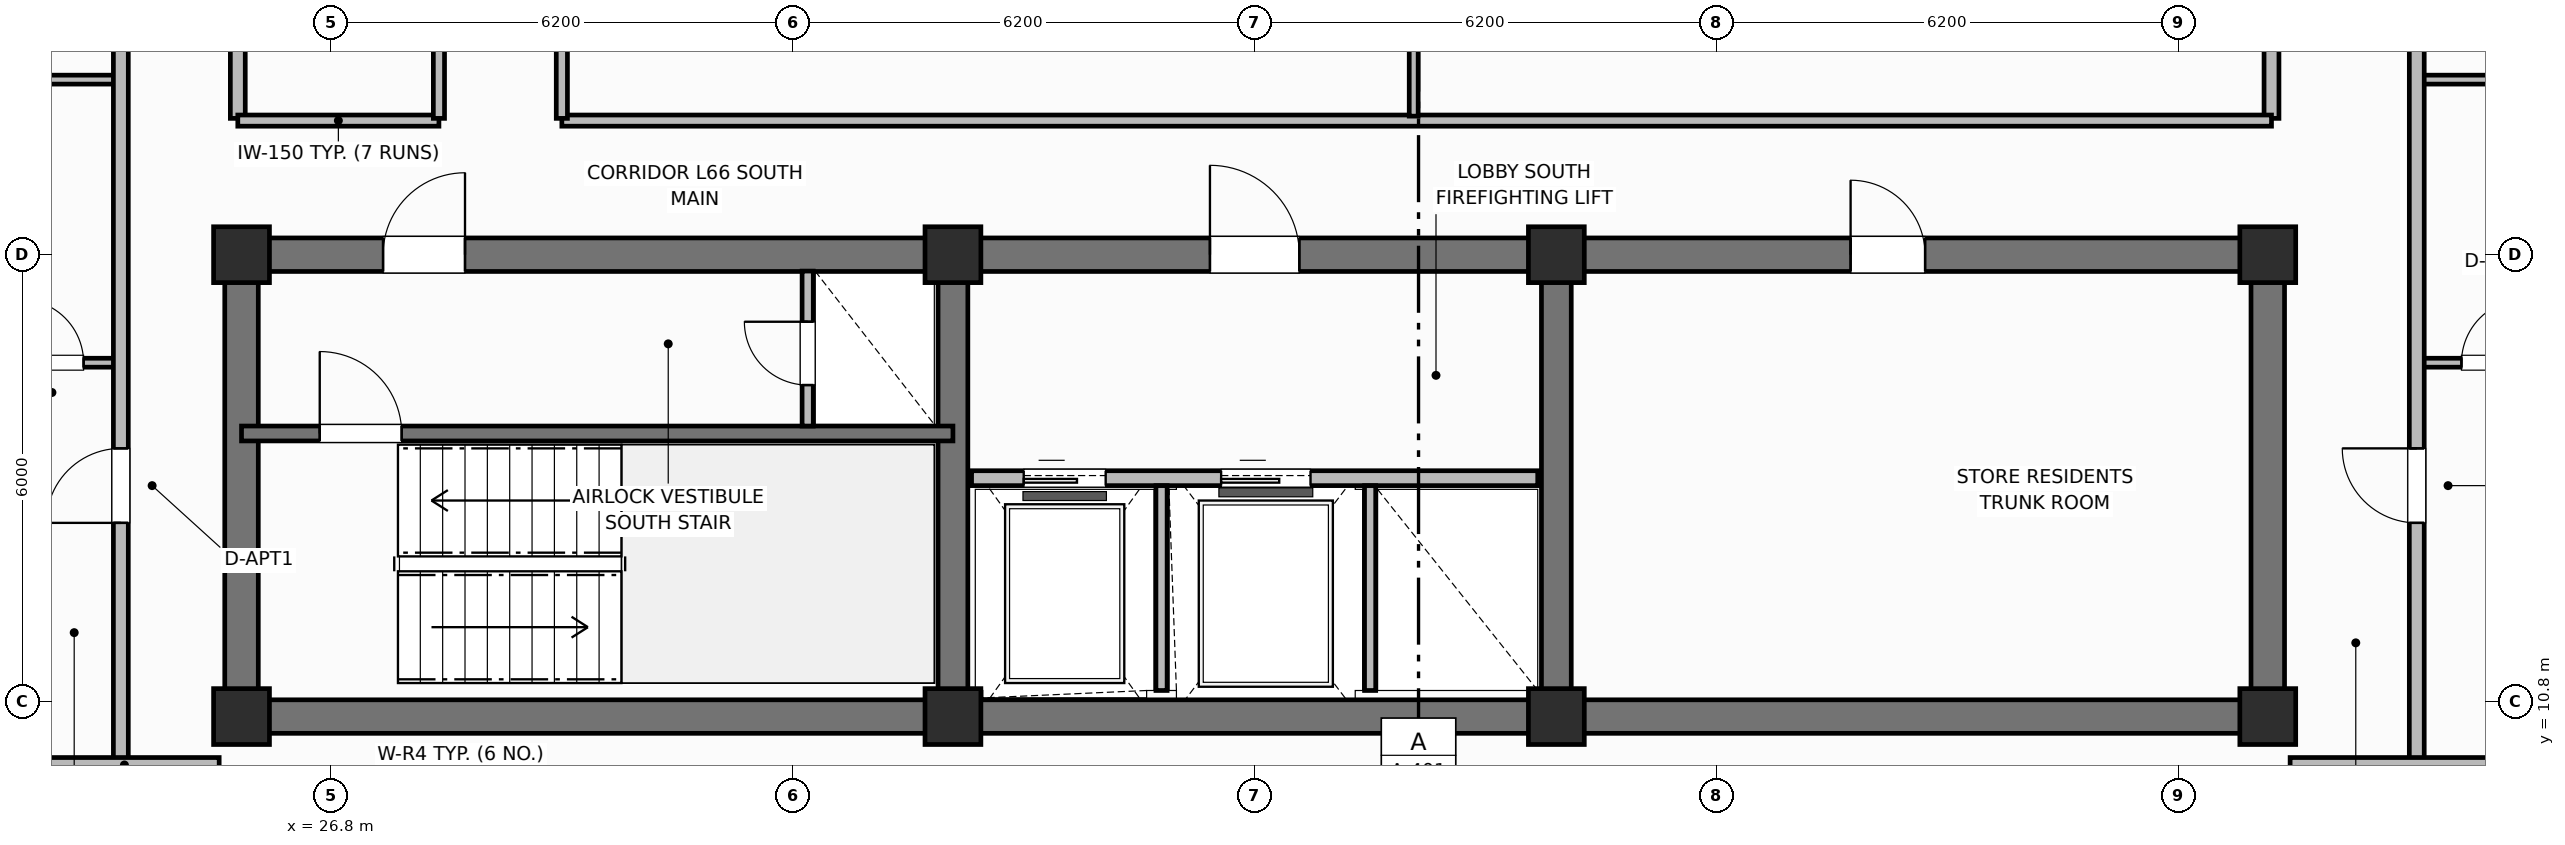
"""IFC4 building model, lengths in metres.
Left out: names, types, materials, properties, quantities, classifications, styles, units other than length and angle.
Written with IfcOpenShell. Run it as: python <this file> out.ifc"""

import sys

from ifc_helpers import new_model, si_unit, direction, frame, frame_2d, origin, origin_2d, place, context, subcontext, project, spatial, rectangle, extrude, element, fill, save


model = new_model("IFC4")
c1 = context("Model", 3, precision=1e-05, world=origin(), true_north=direction((0.0, 1.0)))
c2 = subcontext(c1, "Body", "Model", "MODEL_VIEW")
j1 = project(units=[si_unit("LENGTHUNIT", "METRE"), si_unit("PLANEANGLEUNIT", "RADIAN")], contexts=[c1])
p1 = place(None, origin())
s1 = spatial("IfcSite", under=j1, at=p1, CompositionType="ELEMENT")
p2 = place(p1, origin())
s2 = spatial("IfcBuilding", under=s1, at=p2, CompositionType="ELEMENT")
p3 = place(p2, frame((0.0, 0.0, 263.9)))
s3 = spatial("IfcBuildingStorey", under=s2, at=p3, CompositionType="ELEMENT", Elevation=263.9)
p4 = place(p3, frame((52.8, 10.6, 0.0), z_axis=(0.0, 0.0, 1.0), x_axis=(-1.0, 0.0, 0.0)))
e1 = element("IfcWall", 1, at=p4, inside=s3, PredefinedType="SHEAR", context=c2, shape_type="SweptSolid", body=[
    extrude(rectangle(XDim=27.2, YDim=0.45, at=frame_2d((13.6, 0.0))), origin(), (0.0, 0.0, 1.0), 3.7),
])
for number, where, z_axis, x_axis in (
    (2, (25.6, 10.825, 0.0), (0.0, 0.0, 1.0), (0.0, 1.0, 0.0)),
    (3, (52.8, 10.825, 0.0), (0.0, 0.0, 1.0), (0.0, 1.0, 0.0)),
):
    element("IfcWall", number, at=place(p3, frame(where, z_axis=z_axis, x_axis=x_axis)), inside=s3, PredefinedType="SHEAR", context=c2, shape_type="SweptSolid", body=[
        extrude(rectangle(XDim=5.75, YDim=0.45, at=frame_2d((2.875, 0.0))), origin(), (0.0, 0.0, 1.0), 3.7),
    ])
p5 = place(p3, frame((25.6, 16.8, 0.0), z_axis=(0.0, 0.0, 1.0), x_axis=(1.0, 0.0, 0.0)))
e4 = element("IfcWall", 4, at=p5, inside=s3, PredefinedType="SHEAR", context=c2, shape_type="SweptSolid", body=[
    extrude(rectangle(XDim=27.2, YDim=0.45, at=frame_2d((13.6, 0.0))), origin(), (0.0, 0.0, 1.0), 3.7),
])
p6 = place(p5, frame((1.9, 0.0, 0.0)))
e5 = element("IfcOpeningElement", 5, at=p6, cuts=e4, PredefinedType="OPENING", context=c2, shape_type="SweptSolid", body=[
    extrude(rectangle(XDim=1.1, YDim=2.15, at=frame_2d((0.55, 1.075))), frame((0.0, 0.235, 0.0), z_axis=(0.0, -1.0, 0.0), x_axis=(1.0, 0.0, 0.0)), (0.0, 0.0, 1.0), 0.47),
])
p7 = place(p5, frame((13.0, 0.0, 0.0)))
e6 = element("IfcOpeningElement", 6, at=p7, cuts=e4, PredefinedType="OPENING", context=c2, shape_type="SweptSolid", body=[
    extrude(rectangle(XDim=1.2, YDim=2.15, at=frame_2d((0.6, 1.075))), frame((0.0, 0.235, 0.0), z_axis=(0.0, -1.0, 0.0), x_axis=(1.0, 0.0, 0.0)), (0.0, 0.0, 1.0), 0.47),
])
p8 = place(p5, frame((21.6, 0.0, 0.0)))
e7 = element("IfcOpeningElement", 7, at=p8, cuts=e4, PredefinedType="OPENING", context=c2, shape_type="SweptSolid", body=[
    extrude(rectangle(XDim=1.0, YDim=2.15, at=frame_2d((0.5, 1.075))), frame((0.0, 0.235, 0.0), z_axis=(0.0, -1.0, 0.0), x_axis=(1.0, 0.0, 0.0)), (0.0, 0.0, 1.0), 0.47),
])
for number, where, z_axis, x_axis in (
    (8, (35.15, 10.825, 0.0), (0.0, 0.0, 1.0), (0.0, 1.0, 0.0)),
    (9, (43.25, 10.825, 0.0), (0.0, 0.0, 1.0), (0.0, 1.0, 0.0)),
):
    element("IfcWall", number, at=place(p3, frame(where, z_axis=z_axis, x_axis=x_axis)), inside=s3, PredefinedType="SHEAR", context=c2, shape_type="SweptSolid", body=[
        extrude(rectangle(XDim=5.75, YDim=0.4, at=frame_2d((2.875, 0.0))), origin(), (0.0, 0.0, 1.0), 3.7),
    ])
for number, where, z_axis, x_axis in (
    (10, (25.6, 10.6, 0.0), (0.0, 0.0, 1.0), (1.0, 0.0, 0.0)),
    (11, (25.6, 16.8, 0.0), (0.0, 0.0, 1.0), (1.0, 0.0, 0.0)),
    (12, (35.15, 10.6, 0.0), (0.0, 0.0, 1.0), (1.0, 0.0, 0.0)),
    (13, (35.15, 16.8, 0.0), (0.0, 0.0, 1.0), (1.0, 0.0, 0.0)),
    (14, (43.25, 10.6, 0.0), (0.0, 0.0, 1.0), (1.0, 0.0, 0.0)),
    (15, (43.25, 16.8, 0.0), (0.0, 0.0, 1.0), (1.0, 0.0, 0.0)),
    (16, (52.8, 10.6, 0.0), (0.0, 0.0, 1.0), (1.0, 0.0, 0.0)),
    (17, (52.8, 16.8, 0.0), (0.0, 0.0, 1.0), (1.0, 0.0, 0.0)),
):
    element("IfcColumn", number, at=place(p3, frame(where, z_axis=z_axis, x_axis=x_axis)), inside=s3, PredefinedType="COLUMN", context=c2, shape_type="SweptSolid", body=[
        extrude(rectangle(XDim=0.75, YDim=0.75, at=origin_2d()), origin(), (0.0, 0.0, 1.0), 3.7),
    ])
p9 = place(p3, frame((25.6, 14.4, 0.0), z_axis=(0.0, 0.0, 1.0), x_axis=(1.0, 0.0, 0.0)))
e18 = element("IfcWall", 18, at=p9, inside=s3, PredefinedType="SHEAR", context=c2, shape_type="SweptSolid", body=[
    extrude(rectangle(XDim=9.55, YDim=0.2, at=frame_2d((4.775, 0.0))), origin(), (0.0, 0.0, 1.0), 3.7),
])
p10 = place(p9, frame((1.05, 0.0, 0.0)))
e19 = element("IfcOpeningElement", 19, at=p10, cuts=e18, PredefinedType="OPENING", context=c2, shape_type="SweptSolid", body=[
    extrude(rectangle(XDim=1.1, YDim=2.15, at=frame_2d((0.55, 1.075))), frame((0.0, 0.11, 0.0), z_axis=(0.0, -1.0, 0.0), x_axis=(1.0, 0.0, 0.0)), (0.0, 0.0, 1.0), 0.22),
])
p11 = place(p3, frame((33.2, 14.5, 0.0), z_axis=(0.0, 0.0, 1.0), x_axis=(0.0, 1.0, 0.0)))
e20 = element("IfcWall", 20, at=p11, inside=s3, PredefinedType="PARTITIONING", context=c2, shape_type="SweptSolid", body=[
    extrude(rectangle(XDim=2.08, YDim=0.15, at=frame_2d((1.04, 0.0))), origin(), (0.0, 0.0, 1.0), 2.56),
])
p12 = place(p11, frame((0.55, 0.0, 0.0)))
e21 = element("IfcOpeningElement", 21, at=p12, cuts=e20, PredefinedType="OPENING", context=c2, shape_type="SweptSolid", body=[
    extrude(rectangle(XDim=0.85, YDim=2.05, at=frame_2d((0.425, 1.025))), frame((0.0, 0.085, 0.0), z_axis=(0.0, -1.0, 0.0), x_axis=(1.0, 0.0, 0.0)), (0.0, 0.0, 1.0), 0.17),
])
p13 = place(p3, frame((35.4, 13.8, 0.0), z_axis=(0.0, 0.0, 1.0), x_axis=(1.0, 0.0, 0.0)))
e22 = element("IfcWall", 22, at=p13, inside=s3, PredefinedType="PARTITIONING", context=c2, shape_type="SweptSolid", body=[
    extrude(rectangle(XDim=7.6, YDim=0.2, at=frame_2d((3.8, 0.0))), origin(), (0.0, 0.0, 1.0), 2.33),
])
p14 = place(p13, frame((0.7, 0.0, 0.0)))
e23 = element("IfcOpeningElement", 23, at=p14, cuts=e22, PredefinedType="OPENING", context=c2, shape_type="SweptSolid", body=[
    extrude(rectangle(XDim=1.1, YDim=2.15, at=frame_2d((0.55, 1.075))), frame((0.0, 0.11, 0.0), z_axis=(0.0, -1.0, 0.0), x_axis=(1.0, 0.0, 0.0)), (0.0, 0.0, 1.0), 0.22),
])
p15 = place(p13, frame((3.35, 0.0, 0.0)))
e24 = element("IfcOpeningElement", 24, at=p15, cuts=e22, PredefinedType="OPENING", context=c2, shape_type="SweptSolid", body=[
    extrude(rectangle(XDim=1.2, YDim=2.15, at=frame_2d((0.6, 1.075))), frame((0.0, 0.11, 0.0), z_axis=(0.0, -1.0, 0.0), x_axis=(1.0, 0.0, 0.0)), (0.0, 0.0, 1.0), 0.22),
])
for number, where, z_axis, x_axis in (
    (25, (37.95, 10.95, 0.0), (0.0, 0.0, 1.0), (0.0, 1.0, 0.0)),
    (26, (40.75, 10.95, 0.0), (0.0, 0.0, 1.0), (0.0, 1.0, 0.0)),
):
    element("IfcWall", number, at=place(p3, frame(where, z_axis=z_axis, x_axis=x_axis)), inside=s3, PredefinedType="PARTITIONING", context=c2, shape_type="SweptSolid", body=[
        extrude(rectangle(XDim=2.75, YDim=0.15, at=frame_2d((1.375, 0.0))), origin(), (0.0, 0.0, 1.0), 2.56),
    ])
for number, where, z_axis, x_axis in (
    (27, (25.55, 18.63, 0.0), (0.0, 0.0, 1.0), (0.0, 1.0, 0.0)),
    (28, (52.85, 18.63, 0.0), (0.0, 0.0, 1.0), (0.0, 1.0, 0.0)),
):
    element("IfcWall", number, at=place(p3, frame(where, z_axis=z_axis, x_axis=x_axis)), inside=s3, PredefinedType="PARTITIONING", context=c2, shape_type="SweptSolid", body=[
        extrude(rectangle(XDim=19.14, YDim=0.2, at=frame_2d((9.57, 0.0))), origin(), (0.0, 0.0, 1.0), 2.56),
    ])
p16 = place(p3, frame((25.55, 18.6, 0.0), z_axis=(0.0, 0.0, 1.0), x_axis=(1.0, 0.0, 0.0)))
e29 = element("IfcWall", 29, at=p16, inside=s3, PredefinedType="PARTITIONING", context=c2, shape_type="SweptSolid", body=[
    extrude(rectangle(XDim=2.7, YDim=0.15, at=frame_2d((1.35, 0.0))), origin(), (0.0, 0.0, 1.0), 2.56),
])
p17 = place(p3, frame((29.9, 18.6, 0.0), z_axis=(0.0, 0.0, 1.0), x_axis=(1.0, 0.0, 0.0)))
e30 = element("IfcWall", 30, at=p17, inside=s3, PredefinedType="PARTITIONING", context=c2, shape_type="SweptSolid", body=[
    extrude(rectangle(XDim=22.95, YDim=0.15, at=frame_2d((11.475, 0.0))), origin(), (0.0, 0.0, 1.0), 2.56),
])
p18 = place(p3, frame((41.335, 18.66, 0.0), z_axis=(0.0, 0.0, 1.0), x_axis=(0.0, 1.0, 0.0)))
e31 = element("IfcWall", 31, at=p18, inside=s3, PredefinedType="PARTITIONING", context=c2, shape_type="SweptSolid", body=[
    extrude(rectangle(XDim=6.821, YDim=0.12, at=frame_2d((3.41, 0.0))), origin(), (0.0, 0.0, 1.0), 2.56),
])
p19 = place(p18, frame((2.0, 0.0, 0.0)))
e32 = element("IfcOpeningElement", 32, at=p19, cuts=e31, PredefinedType="OPENING", context=c2, shape_type="SweptSolid", body=[
    extrude(rectangle(XDim=0.9, YDim=2.1, at=frame_2d((0.45, 1.05))), frame((0.0, 0.07, 0.0), z_axis=(0.0, -1.0, 0.0), x_axis=(1.0, 0.0, 0.0)), (0.0, 0.0, 1.0), 0.14),
])
p20 = place(p3, frame((28.25, 18.63, 0.0), z_axis=(0.0, 0.0, 1.0), x_axis=(0.0, 1.0, 0.0)))
e33 = element("IfcWall", 33, at=p20, inside=s3, PredefinedType="PARTITIONING", context=c2, shape_type="SweptSolid", body=[
    extrude(rectangle(XDim=19.14, YDim=0.15, at=frame_2d((9.57, 0.0))), origin(), (0.0, 0.0, 1.0), 2.56),
])
p21 = place(p20, frame((3.0, 0.0, 0.0)))
e34 = element("IfcOpeningElement", 34, at=p21, cuts=e33, PredefinedType="OPENING", context=c2, shape_type="SweptSolid", body=[
    extrude(rectangle(XDim=0.9, YDim=2.1, at=frame_2d((0.45, 1.05))), frame((0.0, 0.085, 0.0), z_axis=(0.0, -1.0, 0.0), x_axis=(1.0, 0.0, 0.0)), (0.0, 0.0, 1.0), 0.17),
])
p22 = place(p20, frame((11.5, 0.0, 0.0)))
e35 = element("IfcOpeningElement", 35, at=p22, cuts=e33, PredefinedType="OPENING", context=c2, shape_type="SweptSolid", body=[
    extrude(rectangle(XDim=0.9, YDim=2.1, at=frame_2d((0.45, 1.05))), frame((0.0, 0.085, 0.0), z_axis=(0.0, -1.0, 0.0), x_axis=(1.0, 0.0, 0.0)), (0.0, 0.0, 1.0), 0.17),
])
p23 = place(p3, frame((29.9, 18.63, 0.0), z_axis=(0.0, 0.0, 1.0), x_axis=(0.0, 1.0, 0.0)))
e36 = element("IfcWall", 36, at=p23, inside=s3, PredefinedType="PARTITIONING", context=c2, shape_type="SweptSolid", body=[
    extrude(rectangle(XDim=19.14, YDim=0.15, at=frame_2d((9.57, 0.0))), origin(), (0.0, 0.0, 1.0), 2.56),
])
p24 = place(p23, frame((2.2, 0.0, 0.0)))
e37 = element("IfcOpeningElement", 37, at=p24, cuts=e36, PredefinedType="OPENING", context=c2, shape_type="SweptSolid", body=[
    extrude(rectangle(XDim=1.0, YDim=2.15, at=frame_2d((0.5, 1.075))), frame((0.0, 0.085, 0.0), z_axis=(0.0, -1.0, 0.0), x_axis=(1.0, 0.0, 0.0)), (0.0, 0.0, 1.0), 0.17),
])
p25 = place(p23, frame((8.89, 0.0, 0.0)))
e38 = element("IfcOpeningElement", 38, at=p25, cuts=e36, PredefinedType="OPENING", context=c2, shape_type="SweptSolid", body=[
    extrude(rectangle(XDim=1.0, YDim=2.15, at=frame_2d((0.5, 1.075))), frame((0.0, 0.085, 0.0), z_axis=(0.0, -1.0, 0.0), x_axis=(1.0, 0.0, 0.0)), (0.0, 0.0, 1.0), 0.17),
])
p26 = place(p3, frame((22.03, 15.35, 0.0), z_axis=(0.0, 0.0, 1.0), x_axis=(1.0, 0.0, 0.0)))
e39 = element("IfcWall", 39, at=p26, inside=s3, PredefinedType="PARTITIONING", context=c2, shape_type="SweptSolid", body=[
    extrude(rectangle(XDim=1.95, YDim=0.12, at=frame_2d((0.975, 0.0))), origin(), (0.0, 0.0, 1.0), 2.56),
])
p27 = place(p26, frame((0.6, 0.0, 0.0)))
e40 = element("IfcOpeningElement", 40, at=p27, cuts=e39, PredefinedType="OPENING", context=c2, shape_type="SweptSolid", body=[
    extrude(rectangle(XDim=0.85, YDim=2.1, at=frame_2d((0.425, 1.05))), frame((0.0, 0.07, 0.0), z_axis=(0.0, -1.0, 0.0), x_axis=(1.0, 0.0, 0.0)), (0.0, 0.0, 1.0), 0.14),
])
p28 = place(p3, frame((22.03, 19.15, 0.0), z_axis=(0.0, 0.0, 1.0), x_axis=(1.0, 0.0, 0.0)))
e41 = element("IfcWall", 41, at=p28, inside=s3, PredefinedType="PARTITIONING", context=c2, shape_type="SweptSolid", body=[
    extrude(rectangle(XDim=1.95, YDim=0.12, at=frame_2d((0.975, 0.0))), origin(), (0.0, 0.0, 1.0), 2.56),
])
p29 = place(p3, frame((23.98, 9.95, 0.0), z_axis=(0.0, 0.0, 1.0), x_axis=(0.0, 1.0, 0.0)))
e42 = element("IfcWall", 42, at=p29, inside=s3, PredefinedType="PARTITIONING", context=c2, shape_type="SweptSolid", body=[
    extrude(rectangle(XDim=36.5, YDim=0.2, at=frame_2d((18.25, 0.0))), origin(), (0.0, 0.0, 1.0), 2.56),
])
p30 = place(p29, frame((3.25, 0.0, 0.0)))
e43 = element("IfcOpeningElement", 43, at=p30, cuts=e42, PredefinedType="OPENING", context=c2, shape_type="SweptSolid", body=[
    extrude(rectangle(XDim=1.0, YDim=2.15, at=frame_2d((0.5, 1.075))), frame((0.0, 0.11, 0.0), z_axis=(0.0, -1.0, 0.0), x_axis=(1.0, 0.0, 0.0)), (0.0, 0.0, 1.0), 0.22),
])
p31 = place(p3, frame((21.546, 9.95, 0.0), z_axis=(0.0, 0.0, 1.0), x_axis=(1.0, 0.0, 0.0)))
e44 = element("IfcWall", 44, at=p31, inside=s3, PredefinedType="PARTITIONING", context=c2, shape_type="SweptSolid", body=[
    extrude(rectangle(XDim=3.754, YDim=0.2, at=frame_2d((1.877, 0.0))), origin(), (0.0, 0.0, 1.0), 2.56),
])
p32 = place(p3, frame((54.8, 15.35, 0.0), z_axis=(0.0, 0.0, 1.0), x_axis=(1.0, 0.0, 0.0)))
e45 = element("IfcWall", 45, at=p32, inside=s3, PredefinedType="PARTITIONING", context=c2, shape_type="SweptSolid", body=[
    extrude(rectangle(XDim=1.95, YDim=0.12, at=frame_2d((0.975, 0.0))), origin(), (0.0, 0.0, 1.0), 2.56),
])
p33 = place(p32, frame((0.6, 0.0, 0.0)))
e46 = element("IfcOpeningElement", 46, at=p33, cuts=e45, PredefinedType="OPENING", context=c2, shape_type="SweptSolid", body=[
    extrude(rectangle(XDim=0.85, YDim=2.1, at=frame_2d((0.425, 1.05))), frame((0.0, 0.07, 0.0), z_axis=(0.0, -1.0, 0.0), x_axis=(1.0, 0.0, 0.0)), (0.0, 0.0, 1.0), 0.14),
])
p34 = place(p3, frame((54.8, 19.15, 0.0), z_axis=(0.0, 0.0, 1.0), x_axis=(1.0, 0.0, 0.0)))
e47 = element("IfcWall", 47, at=p34, inside=s3, PredefinedType="PARTITIONING", context=c2, shape_type="SweptSolid", body=[
    extrude(rectangle(XDim=1.95, YDim=0.12, at=frame_2d((0.975, 0.0))), origin(), (0.0, 0.0, 1.0), 2.56),
])
p35 = place(p3, frame((54.8, 9.95, 0.0), z_axis=(0.0, 0.0, 1.0), x_axis=(0.0, 1.0, 0.0)))
e48 = element("IfcWall", 48, at=p35, inside=s3, PredefinedType="PARTITIONING", context=c2, shape_type="SweptSolid", body=[
    extrude(rectangle(XDim=36.5, YDim=0.2, at=frame_2d((18.25, 0.0))), origin(), (0.0, 0.0, 1.0), 2.56),
])
p36 = place(p35, frame((3.25, 0.0, 0.0)))
e49 = element("IfcOpeningElement", 49, at=p36, cuts=e48, PredefinedType="OPENING", context=c2, shape_type="SweptSolid", body=[
    extrude(rectangle(XDim=1.0, YDim=2.15, at=frame_2d((0.5, 1.075))), frame((0.0, 0.11, 0.0), z_axis=(0.0, -1.0, 0.0), x_axis=(1.0, 0.0, 0.0)), (0.0, 0.0, 1.0), 0.22),
])
p37 = place(p3, frame((53.1, 9.95, 0.0), z_axis=(0.0, 0.0, 1.0), x_axis=(1.0, 0.0, 0.0)))
e50 = element("IfcWall", 50, at=p37, inside=s3, PredefinedType="PARTITIONING", context=c2, shape_type="SweptSolid", body=[
    extrude(rectangle(XDim=3.754, YDim=0.2, at=frame_2d((1.877, 0.0))), origin(), (0.0, 0.0, 1.0), 2.56),
])
p38 = place(p10, origin())
e51 = element("IfcDoor", 51, at=p38, inside=s3, OperationType="SINGLE_SWING_LEFT", PredefinedType="DOOR", context=c2, shape_type="SweptSolid", body=[
    extrude(rectangle(XDim=1.1, YDim=2.15, at=frame_2d((0.55, 1.075))), frame((0.0, 0.025, 0.0), z_axis=(0.0, -1.0, 0.0), x_axis=(1.0, 0.0, 0.0)), (0.0, 0.0, 1.0), 0.05),
])
fill(e19, e51)
p39 = place(p12, origin())
e52 = element("IfcDoor", 52, at=p39, inside=s3, OperationType="SINGLE_SWING_RIGHT", PredefinedType="TRAPDOOR", context=c2, shape_type="SweptSolid", body=[
    extrude(rectangle(XDim=0.85, YDim=2.05, at=frame_2d((0.425, 1.025))), frame((0.0, 0.025, 0.0), z_axis=(0.0, -1.0, 0.0), x_axis=(1.0, 0.0, 0.0)), (0.0, 0.0, 1.0), 0.05),
])
fill(e21, e52)
p40 = place(p14, origin())
e53 = element("IfcDoor", 53, at=p40, inside=s3, OperationType="SLIDING_TO_LEFT", PredefinedType="DOOR", context=c2, shape_type="SweptSolid", body=[
    extrude(rectangle(XDim=1.1, YDim=2.15, at=frame_2d((0.55, 1.075))), frame((0.0, 0.025, 0.0), z_axis=(0.0, -1.0, 0.0), x_axis=(1.0, 0.0, 0.0)), (0.0, 0.0, 1.0), 0.05),
])
fill(e23, e53)
p41 = place(p15, origin())
e54 = element("IfcDoor", 54, at=p41, inside=s3, OperationType="SLIDING_TO_LEFT", PredefinedType="DOOR", context=c2, shape_type="SweptSolid", body=[
    extrude(rectangle(XDim=1.2, YDim=2.15, at=frame_2d((0.6, 1.075))), frame((0.0, 0.025, 0.0), z_axis=(0.0, -1.0, 0.0), x_axis=(1.0, 0.0, 0.0)), (0.0, 0.0, 1.0), 0.05),
])
fill(e24, e54)
p42 = place(p27, origin())
e55 = element("IfcDoor", 55, at=p42, inside=s3, OperationType="SINGLE_SWING_LEFT", PredefinedType="DOOR", context=c2, shape_type="SweptSolid", body=[
    extrude(rectangle(XDim=0.85, YDim=2.1, at=frame_2d((0.425, 1.05))), frame((0.0, 0.025, 0.0), z_axis=(0.0, -1.0, 0.0), x_axis=(1.0, 0.0, 0.0)), (0.0, 0.0, 1.0), 0.05),
])
fill(e40, e55)
p43 = place(p30, origin())
e56 = element("IfcDoor", 56, at=p43, inside=s3, OperationType="SINGLE_SWING_LEFT", PredefinedType="DOOR", context=c2, shape_type="SweptSolid", body=[
    extrude(rectangle(XDim=1.0, YDim=2.15, at=frame_2d((0.5, 1.075))), frame((0.0, 0.025, 0.0), z_axis=(0.0, -1.0, 0.0), x_axis=(1.0, 0.0, 0.0)), (0.0, 0.0, 1.0), 0.05),
])
fill(e43, e56)
p44 = place(p33, origin())
e57 = element("IfcDoor", 57, at=p44, inside=s3, OperationType="SINGLE_SWING_RIGHT", PredefinedType="DOOR", context=c2, shape_type="SweptSolid", body=[
    extrude(rectangle(XDim=0.85, YDim=2.1, at=frame_2d((0.425, 1.05))), frame((0.0, 0.025, 0.0), z_axis=(0.0, -1.0, 0.0), x_axis=(1.0, 0.0, 0.0)), (0.0, 0.0, 1.0), 0.05),
])
fill(e46, e57)
p45 = place(p36, origin())
e58 = element("IfcDoor", 58, at=p45, inside=s3, OperationType="SINGLE_SWING_RIGHT", PredefinedType="DOOR", context=c2, shape_type="SweptSolid", body=[
    extrude(rectangle(XDim=1.0, YDim=2.15, at=frame_2d((0.5, 1.075))), frame((0.0, 0.025, 0.0), z_axis=(0.0, -1.0, 0.0), x_axis=(1.0, 0.0, 0.0)), (0.0, 0.0, 1.0), 0.05),
])
fill(e49, e58)
p46 = place(p6, origin())
e59 = element("IfcDoor", 59, at=p46, inside=s3, OperationType="SINGLE_SWING_RIGHT", PredefinedType="DOOR", context=c2, shape_type="SweptSolid", body=[
    extrude(rectangle(XDim=1.1, YDim=2.15, at=frame_2d((0.55, 1.075))), frame((0.0, 0.025, 0.0), z_axis=(0.0, -1.0, 0.0), x_axis=(1.0, 0.0, 0.0)), (0.0, 0.0, 1.0), 0.05),
])
fill(e5, e59)
p47 = place(p7, origin())
e60 = element("IfcDoor", 60, at=p47, inside=s3, OperationType="SINGLE_SWING_LEFT", PredefinedType="DOOR", context=c2, shape_type="SweptSolid", body=[
    extrude(rectangle(XDim=1.2, YDim=2.15, at=frame_2d((0.6, 1.075))), frame((0.0, 0.025, 0.0), z_axis=(0.0, -1.0, 0.0), x_axis=(1.0, 0.0, 0.0)), (0.0, 0.0, 1.0), 0.05),
])
fill(e6, e60)
p48 = place(p8, origin())
e61 = element("IfcDoor", 61, at=p48, inside=s3, OperationType="SINGLE_SWING_LEFT", PredefinedType="DOOR", context=c2, shape_type="SweptSolid", body=[
    extrude(rectangle(XDim=1.0, YDim=2.15, at=frame_2d((0.5, 1.075))), frame((0.0, 0.025, 0.0), z_axis=(0.0, -1.0, 0.0), x_axis=(1.0, 0.0, 0.0)), (0.0, 0.0, 1.0), 0.05),
])
fill(e7, e61)
save(model, sys.argv[1])
